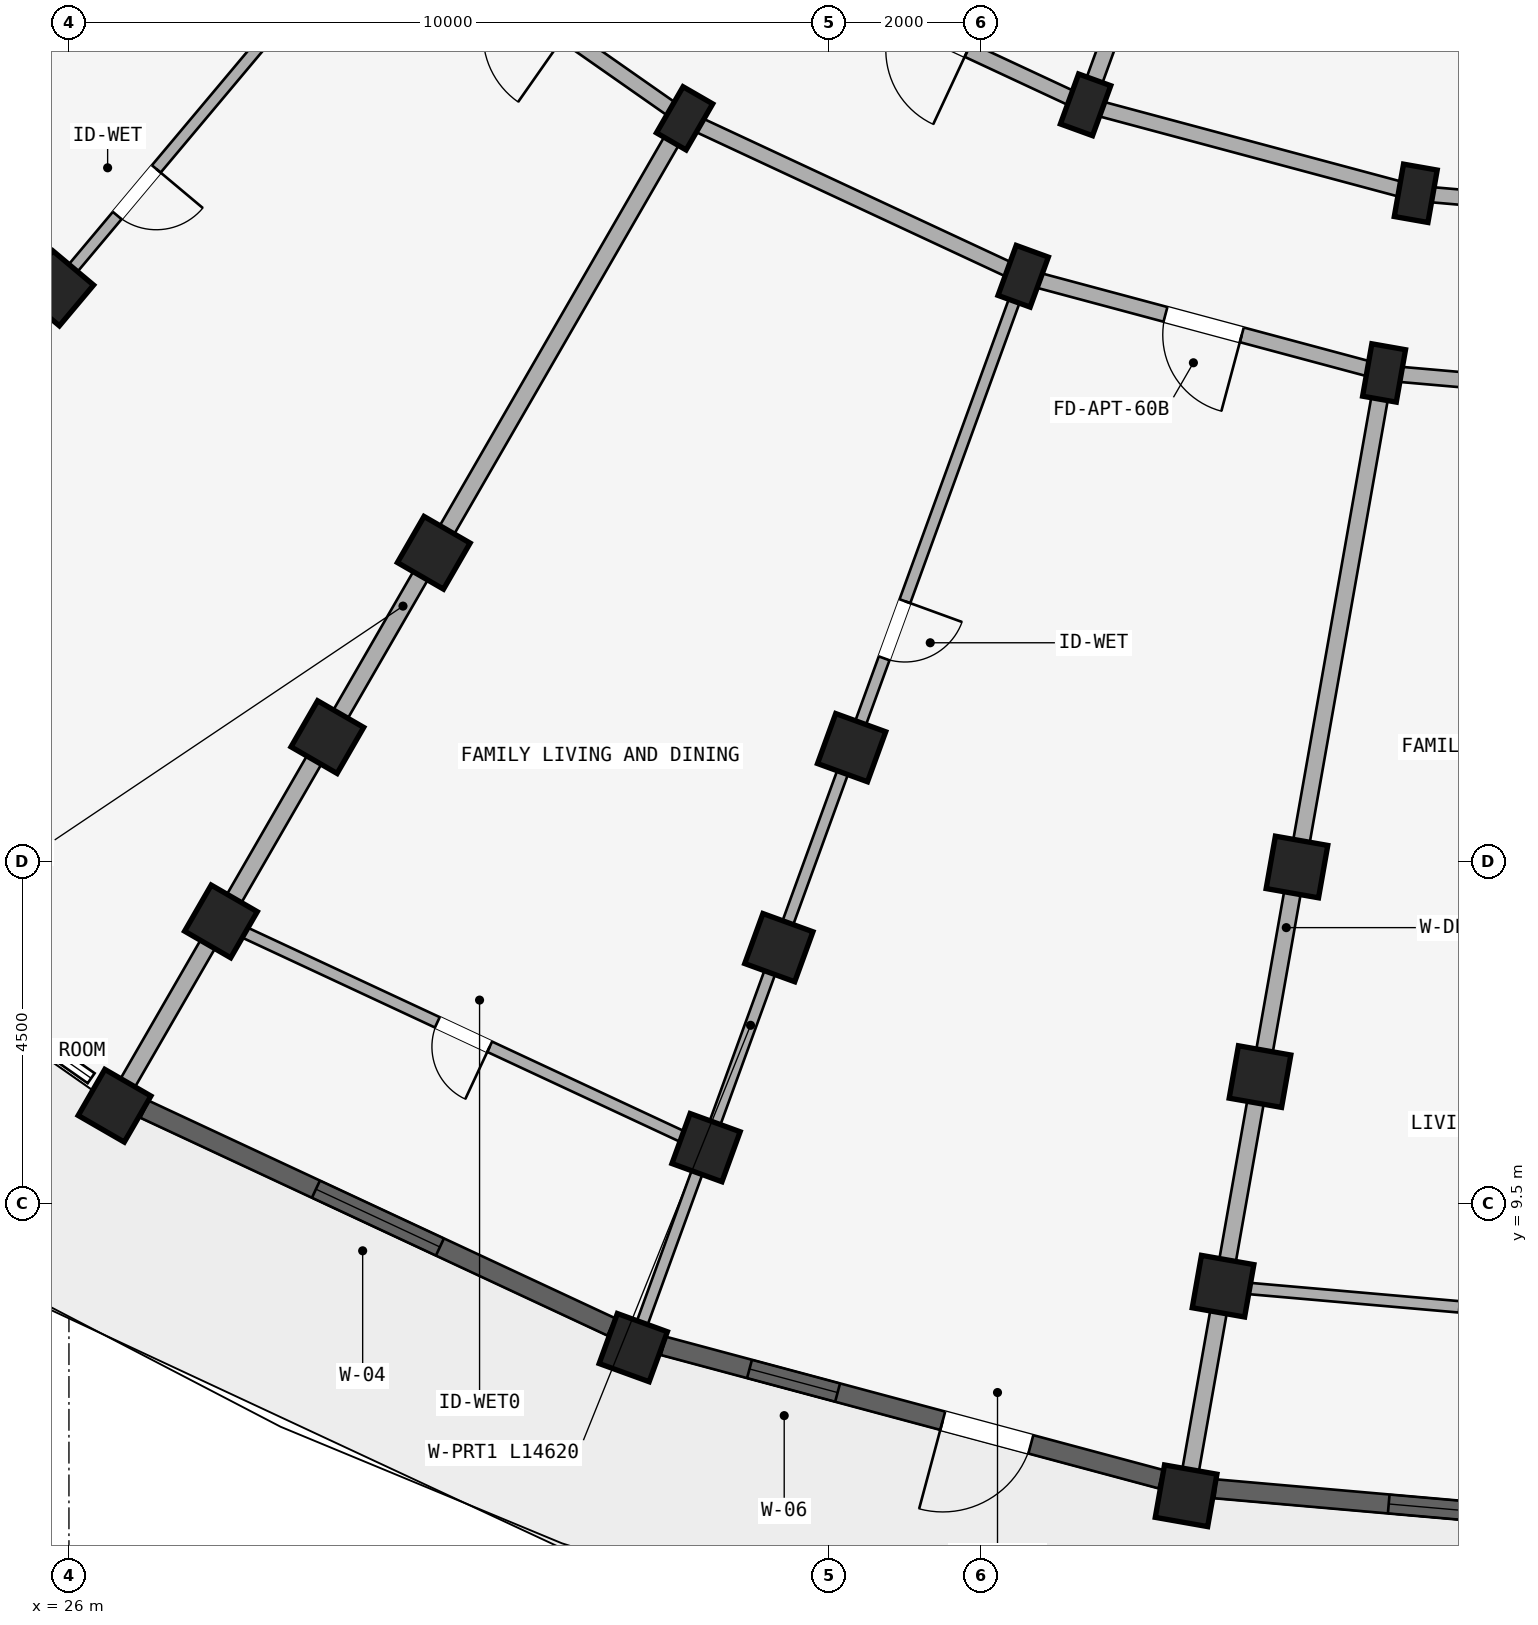
"""IFC4 building model, lengths in metres.
Left out: names, types, materials, properties, quantities, classifications, styles, units other than length and angle.
Written with IfcOpenShell. Run it as: python <this file> out.ifc"""

import sys

from ifc_helpers import new_model, si_unit, direction, frame, frame_2d, origin, origin_2d, place, context, subcontext, project, spatial, rectangle, extrude, element, fill, save


model = new_model("IFC4")
c1 = context("Model", 3, precision=1e-05, world=origin(), true_north=direction((0.0, 1.0)))
c2 = subcontext(c1, "Body", "Model", "MODEL_VIEW")
j1 = project(units=[si_unit("LENGTHUNIT", "METRE"), si_unit("PLANEANGLEUNIT", "RADIAN")], contexts=[c1])
p1 = place(None, origin())
s1 = spatial("IfcSite", under=j1, at=p1, CompositionType="ELEMENT")
p2 = place(p1, origin())
s2 = spatial("IfcBuilding", under=s1, at=p2, CompositionType="ELEMENT")
p3 = place(p2, frame((0.0, 0.0, 21.3)))
s3 = spatial("IfcBuildingStorey", under=s2, at=p3, CompositionType="ELEMENT", Elevation=21.3)
for number, where, z_axis, x_axis in (
    (1, (43.72, 22.792, 0.0), (0.0, 0.0, 1.0), (-0.985, 0.174, 0.0)),
    (2, (43.303, 20.428, 0.0), (0.0, 0.0, 1.0), (-0.985, 0.174, 0.0)),
):
    element("IfcColumn", number, at=place(p3, frame(where, z_axis=z_axis, x_axis=x_axis)), inside=s3, PredefinedType="COLUMN", context=c2, shape_type="SweptSolid", body=[
        extrude(rectangle(XDim=0.45, YDim=0.7, at=origin_2d()), origin(), (0.0, 0.0, 1.0), 2.93),
    ])
for number, where, z_axis, x_axis in (
    (3, (42.157, 13.929, 0.0), (0.0, 0.0, 1.0), (-0.985, 0.174, 0.0)),
    (4, (41.671, 11.171, 0.0), (0.0, 0.0, 1.0), (-0.985, 0.174, 0.0)),
    (5, (41.185, 8.414, 0.0), (0.0, 0.0, 1.0), (-0.985, 0.174, 0.0)),
):
    element("IfcColumn", number, at=place(p3, frame(where, z_axis=z_axis, x_axis=x_axis)), inside=s3, PredefinedType="COLUMN", context=c2, shape_type="SweptSolid", body=[
        extrude(rectangle(XDim=0.7, YDim=0.7, at=origin_2d()), origin(), (0.0, 0.0, 1.0), 2.93),
    ])
p4 = place(p3, frame((40.698, 5.656, 0.0), z_axis=(0.0, 0.0, 1.0), x_axis=(-0.984807753012, 0.173648177667, 0.0)))
e6 = element("IfcColumn", 6, at=p4, inside=s3, PredefinedType="COLUMN", context=c2, shape_type="SweptSolid", body=[
    extrude(rectangle(XDim=0.7, YDim=0.7, at=origin_2d()), origin(), (0.0, 0.0, 1.0), 2.97),
])
for number, where, z_axis, x_axis in (
    (7, (39.376, 23.956, 0.0), (0.0, 0.0, 1.0), (-0.94, 0.342, 0.0)),
    (8, (38.555, 21.701, 0.0), (0.0, 0.0, 1.0), (-0.94, 0.342, 0.0)),
):
    element("IfcColumn", number, at=place(p3, frame(where, z_axis=z_axis, x_axis=x_axis)), inside=s3, PredefinedType="COLUMN", context=c2, shape_type="SweptSolid", body=[
        extrude(rectangle(XDim=0.45, YDim=0.7, at=origin_2d()), origin(), (0.0, 0.0, 1.0), 2.93),
    ])
for number, where, z_axis, x_axis in (
    (9, (36.298, 15.499, 0.0), (0.0, 0.0, 1.0), (-0.94, 0.342, 0.0)),
    (10, (35.34, 12.868, 0.0), (0.0, 0.0, 1.0), (-0.94, 0.342, 0.0)),
    (11, (34.382, 10.236, 0.0), (0.0, 0.0, 1.0), (-0.94, 0.342, 0.0)),
):
    element("IfcColumn", number, at=place(p3, frame(where, z_axis=z_axis, x_axis=x_axis)), inside=s3, PredefinedType="COLUMN", context=c2, shape_type="SweptSolid", body=[
        extrude(rectangle(XDim=0.7, YDim=0.7, at=origin_2d()), origin(), (0.0, 0.0, 1.0), 2.93),
    ])
p5 = place(p3, frame((33.425, 7.605, 0.0), z_axis=(0.0, 0.0, 1.0), x_axis=(-0.939692620786, 0.342020143326, 0.0)))
e12 = element("IfcColumn", 12, at=p5, inside=s3, PredefinedType="COLUMN", context=c2, shape_type="SweptSolid", body=[
    extrude(rectangle(XDim=0.7, YDim=0.7, at=origin_2d()), origin(), (0.0, 0.0, 1.0), 2.97),
])
p6 = place(p3, frame((34.1, 23.778, 0.0), z_axis=(0.0, 0.0, 1.0), x_axis=(-0.866025403784, 0.5, 0.0)))
e13 = element("IfcColumn", 13, at=p6, inside=s3, PredefinedType="COLUMN", context=c2, shape_type="SweptSolid", body=[
    extrude(rectangle(XDim=0.45, YDim=0.7, at=origin_2d()), origin(), (0.0, 0.0, 1.0), 2.93),
])
for number, where, z_axis, x_axis in (
    (14, (30.8, 18.062, 0.0), (0.0, 0.0, 1.0), (-0.866, 0.5, 0.0)),
    (15, (29.4, 15.637, 0.0), (0.0, 0.0, 1.0), (-0.866, 0.5, 0.0)),
    (16, (28.0, 13.213, 0.0), (0.0, 0.0, 1.0), (-0.866, 0.5, 0.0)),
):
    element("IfcColumn", number, at=place(p3, frame(where, z_axis=z_axis, x_axis=x_axis)), inside=s3, PredefinedType="COLUMN", context=c2, shape_type="SweptSolid", body=[
        extrude(rectangle(XDim=0.7, YDim=0.7, at=origin_2d()), origin(), (0.0, 0.0, 1.0), 2.93),
    ])
p7 = place(p3, frame((26.6, 10.788, 0.0), z_axis=(0.0, 0.0, 1.0), x_axis=(-0.866025403784, 0.5, 0.0)))
e17 = element("IfcColumn", 17, at=p7, inside=s3, PredefinedType="COLUMN", context=c2, shape_type="SweptSolid", body=[
    extrude(rectangle(XDim=0.7, YDim=0.7, at=origin_2d()), origin(), (0.0, 0.0, 1.0), 2.97),
])
p8 = place(p3, frame((25.831, 21.542, 0.0), z_axis=(0.0, 0.0, 1.0), x_axis=(-0.766044443119, 0.642787609687, 0.0)))
e18 = element("IfcColumn", 18, at=p8, inside=s3, PredefinedType="COLUMN", context=c2, shape_type="SweptSolid", body=[
    extrude(rectangle(XDim=0.7, YDim=0.7, at=origin_2d()), origin(), (0.0, 0.0, 1.0), 2.93),
])
p9 = place(p3, frame((48.2, 22.4, 0.0), z_axis=(0.0, 0.0, 1.0), x_axis=(-0.996191949488, 0.087187153726, 0.0)))
e19 = element("IfcWall", 19, at=p9, inside=s3, PredefinedType="STANDARD", context=c2, shape_type="SweptSolid", body=[
    extrude(rectangle(XDim=4.497, YDim=0.2, at=frame_2d((2.249, 0.0))), origin(), (0.0, 0.0, 1.0), 2.372),
])
p10 = place(p9, frame((1.729, 0.0, 0.0)))
e20 = element("IfcOpeningElement", 20, at=p10, cuts=e19, PredefinedType="OPENING", context=c2, shape_type="SweptSolid", body=[
    extrude(rectangle(XDim=1.04, YDim=2.15, at=frame_2d((0.52, 1.075))), frame((0.0, 0.11, 0.0), z_axis=(0.0, -1.0, 0.0), x_axis=(1.0, 0.0, 0.0)), (0.0, 0.0, 1.0), 0.22),
])
p11 = place(p3, frame((48.2, 20.0, 0.0), z_axis=(0.0, 0.0, 1.0), x_axis=(-0.996193663584, 0.087167566415, 0.0)))
e21 = element("IfcWall", 21, at=p11, inside=s3, PredefinedType="STANDARD", context=c2, shape_type="SweptSolid", body=[
    extrude(rectangle(XDim=4.916, YDim=0.2, at=frame_2d((2.458, 0.0))), origin(), (0.0, 0.0, 1.0), 2.372),
])
p12 = place(p11, frame((1.958, 0.0, 0.0)))
e22 = element("IfcOpeningElement", 22, at=p12, cuts=e21, PredefinedType="OPENING", context=c2, shape_type="SweptSolid", body=[
    extrude(rectangle(XDim=1.0, YDim=2.15, at=frame_2d((0.5, 1.075))), frame((0.0, 0.11, 0.0), z_axis=(0.0, -1.0, 0.0), x_axis=(1.0, 0.0, 0.0)), (0.0, 0.0, 1.0), 0.22),
])
p13 = place(p3, frame((43.72, 22.792, 0.0), z_axis=(0.0, 0.0, 1.0), x_axis=(-0.965934240054, 0.258787642463, 0.0)))
e23 = element("IfcWall", 23, at=p13, inside=s3, PredefinedType="STANDARD", context=c2, shape_type="SweptSolid", body=[
    extrude(rectangle(XDim=4.497, YDim=0.2, at=frame_2d((2.249, 0.0))), origin(), (0.0, 0.0, 1.0), 2.372),
])
p14 = place(p3, frame((43.303, 20.428, 0.0), z_axis=(0.0, 0.0, 1.0), x_axis=(-0.965930095386, 0.258803112091, 0.0)))
e24 = element("IfcWall", 24, at=p14, inside=s3, PredefinedType="STANDARD", context=c2, shape_type="SweptSolid", body=[
    extrude(rectangle(XDim=4.916, YDim=0.2, at=frame_2d((2.458, 0.0))), origin(), (0.0, 0.0, 1.0), 2.372),
])
p15 = place(p14, frame((1.938, 0.0, 0.0)))
e25 = element("IfcOpeningElement", 25, at=p15, cuts=e24, PredefinedType="OPENING", context=c2, shape_type="SweptSolid", body=[
    extrude(rectangle(XDim=1.04, YDim=2.15, at=frame_2d((0.52, 1.075))), frame((0.0, 0.11, 0.0), z_axis=(0.0, -1.0, 0.0), x_axis=(1.0, 0.0, 0.0)), (0.0, 0.0, 1.0), 0.22),
])
p16 = place(p3, frame((39.376, 23.956, 0.0), z_axis=(0.0, 0.0, 1.0), x_axis=(-0.906307919131, 0.422617978463, 0.0)))
e26 = element("IfcWall", 26, at=p16, inside=s3, PredefinedType="STANDARD", context=c2, shape_type="SweptSolid", body=[
    extrude(rectangle(XDim=4.497, YDim=0.2, at=frame_2d((2.249, 0.0))), origin(), (0.0, 0.0, 1.0), 2.372),
])
p17 = place(p16, frame((1.709, 0.0, 0.0)))
e27 = element("IfcOpeningElement", 27, at=p17, cuts=e26, PredefinedType="OPENING", context=c2, shape_type="SweptSolid", body=[
    extrude(rectangle(XDim=1.08, YDim=2.15, at=frame_2d((0.54, 1.075))), frame((0.0, 0.11, 0.0), z_axis=(0.0, -1.0, 0.0), x_axis=(1.0, 0.0, 0.0)), (0.0, 0.0, 1.0), 0.22),
])
p18 = place(p3, frame((38.555, 21.701, 0.0), z_axis=(0.0, 0.0, 1.0), x_axis=(-0.906302381024, 0.422629854778, 0.0)))
e28 = element("IfcWall", 28, at=p18, inside=s3, PredefinedType="STANDARD", context=c2, shape_type="SweptSolid", body=[
    extrude(rectangle(XDim=4.915, YDim=0.2, at=frame_2d((2.458, 0.0))), origin(), (0.0, 0.0, 1.0), 2.372),
])
p19 = place(p3, frame((34.1, 23.778, 0.0), z_axis=(0.0, 0.0, 1.0), x_axis=(-0.819140911474, 0.573592335331, 0.0)))
e29 = element("IfcWall", 29, at=p19, inside=s3, PredefinedType="STANDARD", context=c2, shape_type="SweptSolid", body=[
    extrude(rectangle(XDim=4.916, YDim=0.2, at=frame_2d((2.458, 0.0))), origin(), (0.0, 0.0, 1.0), 2.372),
])
p20 = place(p19, frame((1.918, 0.0, 0.0)))
e30 = element("IfcOpeningElement", 30, at=p20, cuts=e29, PredefinedType="OPENING", context=c2, shape_type="SweptSolid", body=[
    extrude(rectangle(XDim=1.08, YDim=2.15, at=frame_2d((0.54, 1.075))), frame((0.0, 0.11, 0.0), z_axis=(0.0, -1.0, 0.0), x_axis=(1.0, 0.0, 0.0)), (0.0, 0.0, 1.0), 0.22),
])
p21 = place(p3, frame((43.286, 20.33, 0.0), z_axis=(0.0, 0.0, 1.0), x_axis=(-0.173639577162, -0.984809269474, 0.0)))
e31 = element("IfcWall", 31, at=p21, inside=s3, PredefinedType="STANDARD", context=c2, shape_type="SweptSolid", body=[
    extrude(rectangle(XDim=14.62, YDim=0.22, at=frame_2d((7.31, 0.0))), origin(), (0.0, 0.0, 1.0), 2.372),
])
p22 = place(p3, frame((41.702, 30.346, 0.0), z_axis=(0.0, 0.0, 1.0), x_axis=(-0.342010221662, -0.939696231917, 0.0)))
e32 = element("IfcWall", 32, at=p22, inside=s3, PredefinedType="STANDARD", context=c2, shape_type="SweptSolid", body=[
    extrude(rectangle(XDim=6.75, YDim=0.22, at=frame_2d((3.375, 0.0))), origin(), (0.0, 0.0, 1.0), 2.372),
])
p23 = place(p3, frame((38.521, 21.607, 0.0), z_axis=(0.0, 0.0, 1.0), x_axis=(-0.342015232663, -0.939694408106, 0.0)))
e33 = element("IfcWall", 33, at=p23, inside=s3, PredefinedType="PARTITIONING", context=c2, shape_type="SweptSolid", body=[
    extrude(rectangle(XDim=14.62, YDim=0.15, at=frame_2d((7.31, 0.0))), origin(), (0.0, 0.0, 1.0), 2.372),
])
p24 = place(p23, frame((4.449, 0.0, 0.0)))
e34 = element("IfcOpeningElement", 34, at=p24, cuts=e33, PredefinedType="OPENING", context=c2, shape_type="SweptSolid", body=[
    extrude(rectangle(XDim=0.8, YDim=2.1, at=frame_2d((0.4, 1.05))), frame((0.0, 0.085, 0.0), z_axis=(0.0, -1.0, 0.0), x_axis=(1.0, 0.0, 0.0)), (0.0, 0.0, 1.0), 0.17),
])
p25 = place(p3, frame((34.05, 23.691, 0.0), z_axis=(0.0, 0.0, 1.0), x_axis=(-0.500007702989, -0.866020956416, 0.0)))
e35 = element("IfcWall", 35, at=p25, inside=s3, PredefinedType="STANDARD", context=c2, shape_type="SweptSolid", body=[
    extrude(rectangle(XDim=14.62, YDim=0.22, at=frame_2d((7.31, 0.0))), origin(), (0.0, 0.0, 1.0), 2.372),
])
p26 = place(p3, frame((30.009, 26.521, 0.0), z_axis=(0.0, 0.0, 1.0), x_axis=(-0.642779216656, -0.76605148563, 0.0)))
e36 = element("IfcWall", 36, at=p26, inside=s3, PredefinedType="PARTITIONING", context=c2, shape_type="SweptSolid", body=[
    extrude(rectangle(XDim=14.62, YDim=0.15, at=frame_2d((7.31, 0.0))), origin(), (0.0, 0.0, 1.0), 2.372),
])
p27 = place(p26, frame((4.449, 0.0, 0.0)))
e37 = element("IfcOpeningElement", 37, at=p27, cuts=e36, PredefinedType="OPENING", context=c2, shape_type="SweptSolid", body=[
    extrude(rectangle(XDim=0.8, YDim=2.1, at=frame_2d((0.4, 1.05))), frame((0.0, 0.085, 0.0), z_axis=(0.0, -1.0, 0.0), x_axis=(1.0, 0.0, 0.0)), (0.0, 0.0, 1.0), 0.17),
])
p28 = place(p3, frame((26.521, 30.009, 0.0), z_axis=(0.0, 0.0, 1.0), x_axis=(-0.76605148563, -0.642779216656, 0.0)))
e38 = element("IfcWall", 38, at=p28, inside=s3, PredefinedType="PARTITIONING", context=c2, shape_type="SweptSolid", body=[
    extrude(rectangle(XDim=14.62, YDim=0.15, at=frame_2d((7.31, 0.0))), origin(), (0.0, 0.0, 1.0), 2.372),
])
p29 = place(p28, frame((4.449, 0.0, 0.0)))
e39 = element("IfcOpeningElement", 39, at=p29, cuts=e38, PredefinedType="OPENING", context=c2, shape_type="SweptSolid", body=[
    extrude(rectangle(XDim=0.8, YDim=2.1, at=frame_2d((0.4, 1.05))), frame((0.0, 0.085, 0.0), z_axis=(0.0, -1.0, 0.0), x_axis=(1.0, 0.0, 0.0)), (0.0, 0.0, 1.0), 0.17),
])
p30 = place(p3, frame((48.2, 7.8, 0.0), z_axis=(0.0, 0.0, 1.0), x_axis=(-0.996194658198, 0.087156198737, 0.0)))
e40 = element("IfcWall", 40, at=p30, inside=s3, PredefinedType="PLUMBINGWALL", context=c2, shape_type="SweptSolid", body=[
    extrude(rectangle(XDim=7.042, YDim=0.15, at=frame_2d((3.521, 0.0))), origin(), (0.0, 0.0, 1.0), 2.372),
])
p31 = place(p30, frame((3.121, 0.0, 0.0)))
e41 = element("IfcOpeningElement", 41, at=p31, cuts=e40, PredefinedType="OPENING", context=c2, shape_type="SweptSolid", body=[
    extrude(rectangle(XDim=0.8, YDim=2.1, at=frame_2d((0.4, 1.05))), frame((0.0, 0.085, 0.0), z_axis=(0.0, -1.0, 0.0), x_axis=(1.0, 0.0, 0.0)), (0.0, 0.0, 1.0), 0.17),
])
p32 = place(p3, frame((34.382, 10.236, 0.0), z_axis=(0.0, 0.0, 1.0), x_axis=(-0.906297360311, 0.422640621205, 0.0)))
e42 = element("IfcWall", 42, at=p32, inside=s3, PredefinedType="PLUMBINGWALL", context=c2, shape_type="SweptSolid", body=[
    extrude(rectangle(XDim=7.042, YDim=0.15, at=frame_2d((3.521, 0.0))), origin(), (0.0, 0.0, 1.0), 2.372),
])
p33 = place(p32, frame((3.141, 0.0, 0.0)))
e43 = element("IfcOpeningElement", 43, at=p33, cuts=e42, PredefinedType="OPENING", context=c2, shape_type="SweptSolid", body=[
    extrude(rectangle(XDim=0.76, YDim=2.05, at=frame_2d((0.38, 1.025))), frame((0.0, 0.085, 0.0), z_axis=(0.0, -1.0, 0.0), x_axis=(1.0, 0.0, 0.0)), (0.0, 0.0, 1.0), 0.17),
])
p34 = place(p3, frame((47.836, 5.157, 0.0), z_axis=(0.0, 0.0, 1.0), x_axis=(-0.996194225705, 0.087161141987, 0.0)))
e44 = element("IfcWall", 44, at=p34, inside=s3, PredefinedType="STANDARD", context=c2, shape_type="SweptSolid", body=[
    extrude(rectangle(XDim=6.779, YDim=0.25, at=frame_2d((3.389, 0.0))), origin(), (0.0, 0.0, 1.0), 2.48),
])
p35 = place(p34, frame((2.289, 0.0, 0.38)))
e45 = element("IfcOpeningElement", 45, at=p35, cuts=e44, PredefinedType="OPENING", context=c2, shape_type="SweptSolid", body=[
    extrude(rectangle(XDim=2.2, YDim=1.9, at=frame_2d((1.1, 0.95))), frame((0.0, 0.135, 0.0), z_axis=(0.0, -1.0, 0.0), x_axis=(1.0, 0.0, 0.0)), (0.0, 0.0, 1.0), 0.27),
])
p36 = place(p3, frame((40.368, 5.874, 0.0), z_axis=(0.0, 0.0, 1.0), x_axis=(-0.96592699134, 0.258814697035, 0.0)))
e46 = element("IfcWall", 46, at=p36, inside=s3, PredefinedType="STANDARD", context=c2, shape_type="SweptSolid", body=[
    extrude(rectangle(XDim=6.779, YDim=0.25, at=frame_2d((3.389, 0.0))), origin(), (0.0, 0.0, 1.0), 2.48),
])
p37 = place(p36, frame((4.405, 0.0, 0.53)))
e47 = element("IfcOpeningElement", 47, at=p37, cuts=e46, PredefinedType="OPENING", context=c2, shape_type="SweptSolid", body=[
    extrude(rectangle(XDim=1.2, YDim=1.5, at=frame_2d((0.6, 0.75))), frame((0.0, 0.135, 0.0), z_axis=(0.0, -1.0, 0.0), x_axis=(1.0, 0.0, 0.0)), (0.0, 0.0, 1.0), 0.27),
])
p38 = place(p36, frame((1.772, 0.0, 0.0)))
e48 = element("IfcOpeningElement", 48, at=p38, cuts=e46, PredefinedType="OPENING", context=c2, shape_type="SweptSolid", body=[
    extrude(rectangle(XDim=1.2, YDim=2.15, at=frame_2d((0.6, 1.075))), frame((0.0, 0.135, 0.0), z_axis=(0.0, -1.0, 0.0), x_axis=(1.0, 0.0, 0.0)), (0.0, 0.0, 1.0), 0.27),
])
p39 = place(p3, frame((33.137, 7.877, 0.0), z_axis=(0.0, 0.0, 1.0), x_axis=(-0.906310075746, 0.422613353553, 0.0)))
e49 = element("IfcWall", 49, at=p39, inside=s3, PredefinedType="STANDARD", context=c2, shape_type="SweptSolid", body=[
    extrude(rectangle(XDim=6.779, YDim=0.25, at=frame_2d((3.389, 0.0))), origin(), (0.0, 0.0, 1.0), 2.48),
])
p40 = place(p39, frame((2.489, 0.0, 0.63)))
e50 = element("IfcOpeningElement", 50, at=p40, cuts=e49, PredefinedType="OPENING", context=c2, shape_type="SweptSolid", body=[
    extrude(rectangle(XDim=1.8, YDim=1.65, at=frame_2d((0.9, 0.825))), frame((0.0, 0.135, 0.0), z_axis=(0.0, -1.0, 0.0), x_axis=(1.0, 0.0, 0.0)), (0.0, 0.0, 1.0), 0.27),
])
p41 = place(p35, origin())
e51 = element("IfcWindow", 51, at=p41, inside=s3, PartitioningType="TRIPLE_PANEL_VERTICAL", PredefinedType="WINDOW", context=c2, shape_type="SweptSolid", body=[
    extrude(rectangle(XDim=2.2, YDim=1.9, at=frame_2d((1.1, 0.95))), frame((0.0, 0.03, 0.0), z_axis=(0.0, -1.0, 0.0), x_axis=(1.0, 0.0, 0.0)), (0.0, 0.0, 1.0), 0.06),
])
fill(e45, e51)
p42 = place(p37, origin())
e52 = element("IfcWindow", 52, at=p42, inside=s3, PartitioningType="SINGLE_PANEL", PredefinedType="WINDOW", context=c2, shape_type="SweptSolid", body=[
    extrude(rectangle(XDim=1.2, YDim=1.5, at=frame_2d((0.6, 0.75))), frame((0.0, 0.03, 0.0), z_axis=(0.0, -1.0, 0.0), x_axis=(1.0, 0.0, 0.0)), (0.0, 0.0, 1.0), 0.06),
])
fill(e47, e52)
p43 = place(p40, origin())
e53 = element("IfcWindow", 53, at=p43, inside=s3, PartitioningType="DOUBLE_PANEL_VERTICAL", PredefinedType="WINDOW", context=c2, shape_type="SweptSolid", body=[
    extrude(rectangle(XDim=1.8, YDim=1.65, at=frame_2d((0.9, 0.825))), frame((0.0, 0.03, 0.0), z_axis=(0.0, -1.0, 0.0), x_axis=(1.0, 0.0, 0.0)), (0.0, 0.0, 1.0), 0.06),
])
fill(e50, e53)
p44 = place(p24, frame((0.8, 0.0, 0.0), z_axis=(0.0, 0.0, 1.0), x_axis=(-1.0, 0.0, 0.0)))
e54 = element("IfcDoor", 54, at=p44, inside=s3, OperationType="SINGLE_SWING_RIGHT", PredefinedType="DOOR", context=c2, shape_type="SweptSolid", body=[
    extrude(rectangle(XDim=0.8, YDim=2.1, at=frame_2d((0.4, 1.05))), frame((0.0, 0.025, 0.0), z_axis=(0.0, -1.0, 0.0), x_axis=(1.0, 0.0, 0.0)), (0.0, 0.0, 1.0), 0.05),
])
fill(e34, e54)
p45 = place(p27, origin())
e55 = element("IfcDoor", 55, at=p45, inside=s3, OperationType="SINGLE_SWING_LEFT", PredefinedType="DOOR", context=c2, shape_type="SweptSolid", body=[
    extrude(rectangle(XDim=0.8, YDim=2.1, at=frame_2d((0.4, 1.05))), frame((0.0, 0.025, 0.0), z_axis=(0.0, -1.0, 0.0), x_axis=(1.0, 0.0, 0.0)), (0.0, 0.0, 1.0), 0.05),
])
fill(e37, e55)
p46 = place(p15, frame((1.04, 0.0, 0.0), z_axis=(0.0, 0.0, 1.0), x_axis=(-1.0, 0.0, 0.0)))
e56 = element("IfcDoor", 56, at=p46, inside=s3, OperationType="SINGLE_SWING_RIGHT", PredefinedType="DOOR", context=c2, shape_type="SweptSolid", body=[
    extrude(rectangle(XDim=1.04, YDim=2.15, at=frame_2d((0.52, 1.075))), frame((0.0, 0.025, 0.0), z_axis=(0.0, -1.0, 0.0), x_axis=(1.0, 0.0, 0.0)), (0.0, 0.0, 1.0), 0.05),
])
fill(e25, e56)
p47 = place(p33, origin())
e57 = element("IfcDoor", 57, at=p47, inside=s3, OperationType="SINGLE_SWING_LEFT", PredefinedType="DOOR", context=c2, shape_type="SweptSolid", body=[
    extrude(rectangle(XDim=0.76, YDim=2.05, at=frame_2d((0.38, 1.025))), frame((0.0, 0.025, 0.0), z_axis=(0.0, -1.0, 0.0), x_axis=(1.0, 0.0, 0.0)), (0.0, 0.0, 1.0), 0.05),
])
fill(e43, e57)
p48 = place(p38, origin())
e58 = element("IfcDoor", 58, at=p48, inside=s3, OperationType="SINGLE_SWING_RIGHT", PredefinedType="DOOR", context=c2, shape_type="SweptSolid", body=[
    extrude(rectangle(XDim=1.2, YDim=2.15, at=frame_2d((0.6, 1.075))), frame((0.0, 0.025, 0.0), z_axis=(0.0, -1.0, 0.0), x_axis=(1.0, 0.0, 0.0)), (0.0, 0.0, 1.0), 0.05),
])
fill(e48, e58)
save(model, sys.argv[1])
